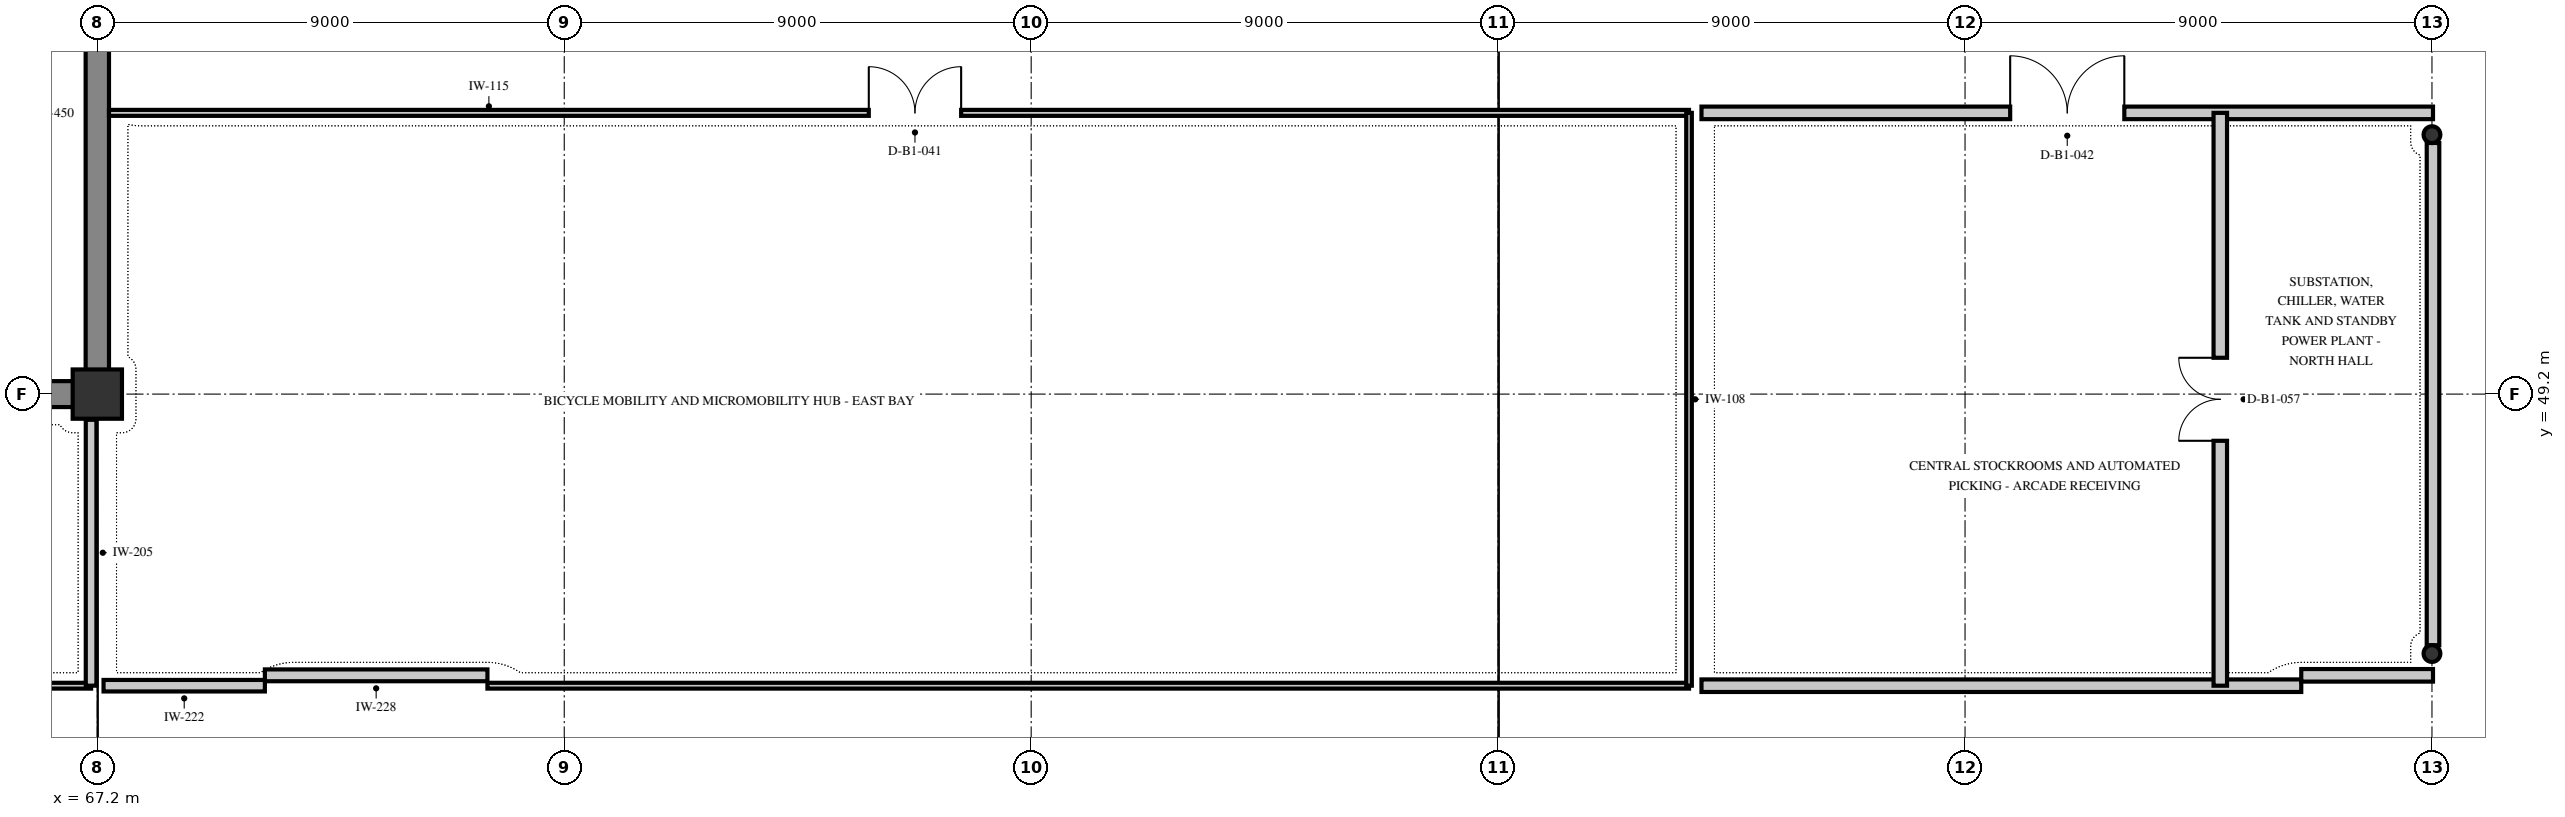
"""IFC4 building model, lengths in metres.
Left out: names, types, materials, properties, quantities, classifications, styles, units other than length and angle.
Written with IfcOpenShell. Run it as: python <this file> out.ifc"""

import sys

from ifc_helpers import new_model, si_unit, direction, frame, frame_2d, origin, origin_2d, place, context, subcontext, project, spatial, rectangle, hollow_circle, extrude, element, fill, save


model = new_model("IFC4")
c1 = context("Model", 3, precision=1e-05, world=origin(), true_north=direction((0.0, 1.0)))
c2 = subcontext(c1, "Body", "Model", "MODEL_VIEW")
j1 = project(units=[si_unit("LENGTHUNIT", "METRE"), si_unit("PLANEANGLEUNIT", "RADIAN")], contexts=[c1])
p1 = place(None, origin())
s1 = spatial("IfcSite", under=j1, at=p1, CompositionType="ELEMENT")
p2 = place(p1, origin())
s2 = spatial("IfcBuilding", under=s1, at=p2, CompositionType="ELEMENT")
p3 = place(p2, frame((0.0, 0.0, -4.8)))
s3 = spatial("IfcBuildingStorey", under=s2, at=p3, CompositionType="ELEMENT", Elevation=-4.8)
p4 = place(p3, frame((67.2, 49.2, 0.0), z_axis=(0.0, 0.0, 1.0), x_axis=(1.0, 0.0, 0.0)))
e1 = element("IfcColumn", 1, at=p4, inside=s3, PredefinedType="COLUMN", context=c2, shape_type="SweptSolid", body=[
    extrude(rectangle(XDim=0.95, YDim=0.95, at=origin_2d()), origin(), (0.0, 0.0, 1.0), 4.8),
])
for number, where, z_axis, x_axis in (
    (2, (112.2, 44.2, 0.0), (0.0, 0.0, 1.0), (1.0, 0.0, 0.0)),
    (3, (112.2, 54.2, 0.0), (0.0, 0.0, 1.0), (1.0, 0.0, 0.0)),
):
    element("IfcColumn", number, at=place(p3, frame(where, z_axis=z_axis, x_axis=x_axis)), inside=s3, PredefinedType="COLUMN", context=c2, shape_type="SweptSolid", body=[
        extrude(hollow_circle(Radius=0.162, WallThickness=0.01, at=origin_2d()), origin(), (0.0, 0.0, 1.0), 4.8),
    ])
p5 = place(p3, frame((0.0, 49.2, 0.0), z_axis=(0.0, 0.0, 1.0), x_axis=(1.0, 0.0, 0.0)))
e4 = element("IfcWall", 4, at=p5, inside=s3, PredefinedType="USERDEFINED", context=c2, shape_type="SweptSolid", body=[
    extrude(rectangle(XDim=67.2, YDim=0.5, at=frame_2d((33.6, 0.0))), origin(), (0.0, 0.0, 1.0), 4.5),
])
p6 = place(p3, frame((67.2, 49.2, 0.0), z_axis=(0.0, 0.0, 1.0), x_axis=(0.0, 1.0, 0.0)))
e5 = element("IfcWall", 5, at=p6, inside=s3, PredefinedType="USERDEFINED", context=c2, shape_type="SweptSolid", body=[
    extrude(rectangle(XDim=10.8, YDim=0.45, at=frame_2d((5.4, 0.0))), origin(), (0.0, 0.0, 1.0), 4.5),
])
p7 = place(p3, frame((67.08, 43.58, 0.0), z_axis=(0.0, 0.0, 1.0), x_axis=(-1.0, 0.0, 0.0)))
e6 = element("IfcWall", 6, at=p7, inside=s3, PredefinedType="PARTITIONING", context=c2, shape_type="SweptSolid", body=[
    extrude(rectangle(XDim=18.773, YDim=0.112, at=frame_2d((9.387, 0.0))), origin(), (0.0, 0.0, 1.0), 3.44),
])
p8 = place(p7, frame((8.927, 0.0, 0.0)))
e7 = element("IfcOpeningElement", 7, at=p8, cuts=e6, PredefinedType="OPENING", context=c2, shape_type="SweptSolid", body=[
    extrude(rectangle(XDim=0.92, YDim=2.1, at=frame_2d((0.46, 1.05))), frame((0.0, 0.068, 0.0), z_axis=(0.0, -1.0, 0.0), x_axis=(1.0, 0.0, 0.0)), (0.0, 0.0, 1.0), 0.136),
])
p9 = place(p3, frame((67.08, 48.705, 0.0), z_axis=(0.0, 0.0, 1.0), x_axis=(0.0, -1.0, 0.0)))
e8 = element("IfcWall", 8, at=p9, inside=s3, PredefinedType="PARTITIONING", context=c2, shape_type="SweptSolid", body=[
    extrude(rectangle(XDim=5.125, YDim=0.205, at=frame_2d((2.562, 0.0))), origin(), (0.0, 0.0, 1.0), 3.44),
])
p10 = place(p3, frame((67.425, 54.62, 0.0), z_axis=(0.0, 0.0, 1.0), x_axis=(1.0, 0.0, 0.0)))
e9 = element("IfcWall", 9, at=p10, inside=s3, PredefinedType="PARTITIONING", context=c2, shape_type="SweptSolid", body=[
    extrude(rectangle(XDim=30.455, YDim=0.115, at=frame_2d((15.228, 0.0))), origin(), (0.0, 0.0, 1.0), 4.5),
])
p11 = place(p10, frame((14.645, 0.0, 0.0)))
e10 = element("IfcOpeningElement", 10, at=p11, cuts=e9, PredefinedType="OPENING", context=c2, shape_type="SweptSolid", body=[
    extrude(rectangle(XDim=1.78, YDim=2.32, at=frame_2d((0.89, 1.16))), frame((0.0, 0.069, 0.0), z_axis=(0.0, -1.0, 0.0), x_axis=(1.0, 0.0, 0.0)), (0.0, 0.0, 1.0), 0.139),
])
p12 = place(p3, frame((97.88, 43.58, 0.0), z_axis=(0.0, 0.0, 1.0), x_axis=(-1.0, 0.0, 0.0)))
e11 = element("IfcWall", 11, at=p12, inside=s3, PredefinedType="PARTITIONING", context=c2, shape_type="SweptSolid", body=[
    extrude(rectangle(XDim=23.16, YDim=0.112, at=frame_2d((11.58, 0.0))), origin(), (0.0, 0.0, 1.0), 4.5),
])
p13 = place(p3, frame((97.88, 54.62, 0.0), z_axis=(0.0, 0.0, 1.0), x_axis=(0.0, -1.0, 0.0)))
e12 = element("IfcWall", 12, at=p13, inside=s3, PredefinedType="PARTITIONING", context=c2, shape_type="SweptSolid", body=[
    extrude(rectangle(XDim=11.04, YDim=0.108, at=frame_2d((5.52, 0.0))), origin(), (0.0, 0.0, 1.0), 4.5),
])
p14 = place(p3, frame((74.719, 43.78, 0.0), z_axis=(0.0, 0.0, 1.0), x_axis=(-1.0, 0.0, 0.0)))
e13 = element("IfcWall", 13, at=p14, inside=s3, PredefinedType="PARTITIONING", context=c2, shape_type="SweptSolid", body=[
    extrude(rectangle(XDim=4.29, YDim=0.228, at=frame_2d((2.145, 0.0))), origin(), (0.0, 0.0, 1.0), 4.5),
])
p15 = place(p3, frame((70.43, 43.58, 0.0), z_axis=(0.0, 0.0, 1.0), x_axis=(-1.0, 0.0, 0.0)))
e14 = element("IfcWall", 14, at=p15, inside=s3, PredefinedType="PARTITIONING", context=c2, shape_type="SweptSolid", body=[
    extrude(rectangle(XDim=3.11, YDim=0.222, at=frame_2d((1.555, 0.0))), origin(), (0.0, 0.0, 1.0), 3.44),
])
p16 = place(p3, frame((98.12, 54.62, 0.0), z_axis=(0.0, 0.0, 1.0), x_axis=(1.0, 0.0, 0.0)))
e15 = element("IfcWall", 15, at=p16, inside=s3, PredefinedType="PARTITIONING", context=c2, shape_type="SweptSolid", body=[
    extrude(rectangle(XDim=14.1, YDim=0.242, at=frame_2d((7.05, 0.0))), origin(), (0.0, 0.0, 1.0), 4.5),
])
p17 = place(p16, frame((5.95, 0.0, 0.0)))
e16 = element("IfcOpeningElement", 16, at=p17, cuts=e15, PredefinedType="OPENING", context=c2, shape_type="SweptSolid", body=[
    extrude(rectangle(XDim=2.2, YDim=2.5, at=frame_2d((1.1, 1.25))), frame((0.0, 0.133, 0.0), z_axis=(0.0, -1.0, 0.0), x_axis=(1.0, 0.0, 0.0)), (0.0, 0.0, 1.0), 0.266),
])
p18 = place(p3, frame((109.681, 43.58, 0.0), z_axis=(0.0, 0.0, 1.0), x_axis=(-1.0, 0.0, 0.0)))
e17 = element("IfcWall", 17, at=p18, inside=s3, PredefinedType="PARTITIONING", context=c2, shape_type="SweptSolid", body=[
    extrude(rectangle(XDim=11.561, YDim=0.242, at=frame_2d((5.78, 0.0))), origin(), (0.0, 0.0, 1.0), 4.5),
])
p19 = place(p3, frame((112.22, 54.04, 0.0), z_axis=(0.0, 0.0, 1.0), x_axis=(0.0, -1.0, 0.0)))
e18 = element("IfcWall", 18, at=p19, inside=s3, PredefinedType="PARTITIONING", context=c2, shape_type="SweptSolid", body=[
    extrude(rectangle(XDim=9.68, YDim=0.242, at=frame_2d((4.84, 0.0))), origin(), (0.0, 0.0, 1.0), 4.5),
])
p20 = place(p3, frame((112.22, 43.78, 0.0), z_axis=(0.0, 0.0, 1.0), x_axis=(-1.0, 0.0, 0.0)))
e19 = element("IfcWall", 19, at=p20, inside=s3, PredefinedType="PARTITIONING", context=c2, shape_type="SweptSolid", body=[
    extrude(rectangle(XDim=2.539, YDim=0.242, at=frame_2d((1.27, 0.0))), origin(), (0.0, 0.0, 1.0), 4.5),
])
p21 = place(p3, frame((108.12, 43.58, 0.0), z_axis=(0.0, 0.0, 1.0), x_axis=(0.0, 1.0, 0.0)))
e20 = element("IfcWall", 20, at=p21, inside=s3, PredefinedType="PARTITIONING", context=c2, shape_type="SweptSolid", body=[
    extrude(rectangle(XDim=11.04, YDim=0.26, at=frame_2d((5.52, 0.0))), origin(), (0.0, 0.0, 1.0), 4.5),
])
p22 = place(p21, frame((4.72, 0.0, 0.0)))
e21 = element("IfcOpeningElement", 21, at=p22, cuts=e20, PredefinedType="OPENING", context=c2, shape_type="SweptSolid", body=[
    extrude(rectangle(XDim=1.6, YDim=2.3, at=frame_2d((0.8, 1.15))), frame((0.0, 0.142, 0.0), z_axis=(0.0, -1.0, 0.0), x_axis=(1.0, 0.0, 0.0)), (0.0, 0.0, 1.0), 0.284),
])
p23 = place(p11, origin())
e22 = element("IfcDoor", 22, at=p23, inside=s3, OperationType="DOUBLE_DOOR_SINGLE_SWING", PredefinedType="DOOR", context=c2, shape_type="SweptSolid", body=[
    extrude(rectangle(XDim=1.78, YDim=2.32, at=frame_2d((0.89, 1.16))), frame((0.0, 0.025, 0.0), z_axis=(0.0, -1.0, 0.0), x_axis=(1.0, 0.0, 0.0)), (0.0, 0.0, 1.0), 0.05),
])
fill(e10, e22)
p24 = place(p17, origin())
e23 = element("IfcDoor", 23, at=p24, inside=s3, OperationType="DOUBLE_DOOR_SINGLE_SWING", PredefinedType="DOOR", context=c2, shape_type="SweptSolid", body=[
    extrude(rectangle(XDim=2.2, YDim=2.5, at=frame_2d((1.1, 1.25))), frame((0.0, 0.025, 0.0), z_axis=(0.0, -1.0, 0.0), x_axis=(1.0, 0.0, 0.0)), (0.0, 0.0, 1.0), 0.05),
])
fill(e16, e23)
p25 = place(p22, origin())
e24 = element("IfcDoor", 24, at=p25, inside=s3, OperationType="DOUBLE_DOOR_SINGLE_SWING", PredefinedType="DOOR", context=c2, shape_type="SweptSolid", body=[
    extrude(rectangle(XDim=1.6, YDim=2.3, at=frame_2d((0.8, 1.15))), frame((0.0, 0.025, 0.0), z_axis=(0.0, -1.0, 0.0), x_axis=(1.0, 0.0, 0.0)), (0.0, 0.0, 1.0), 0.05),
])
fill(e21, e24)
save(model, sys.argv[1])
